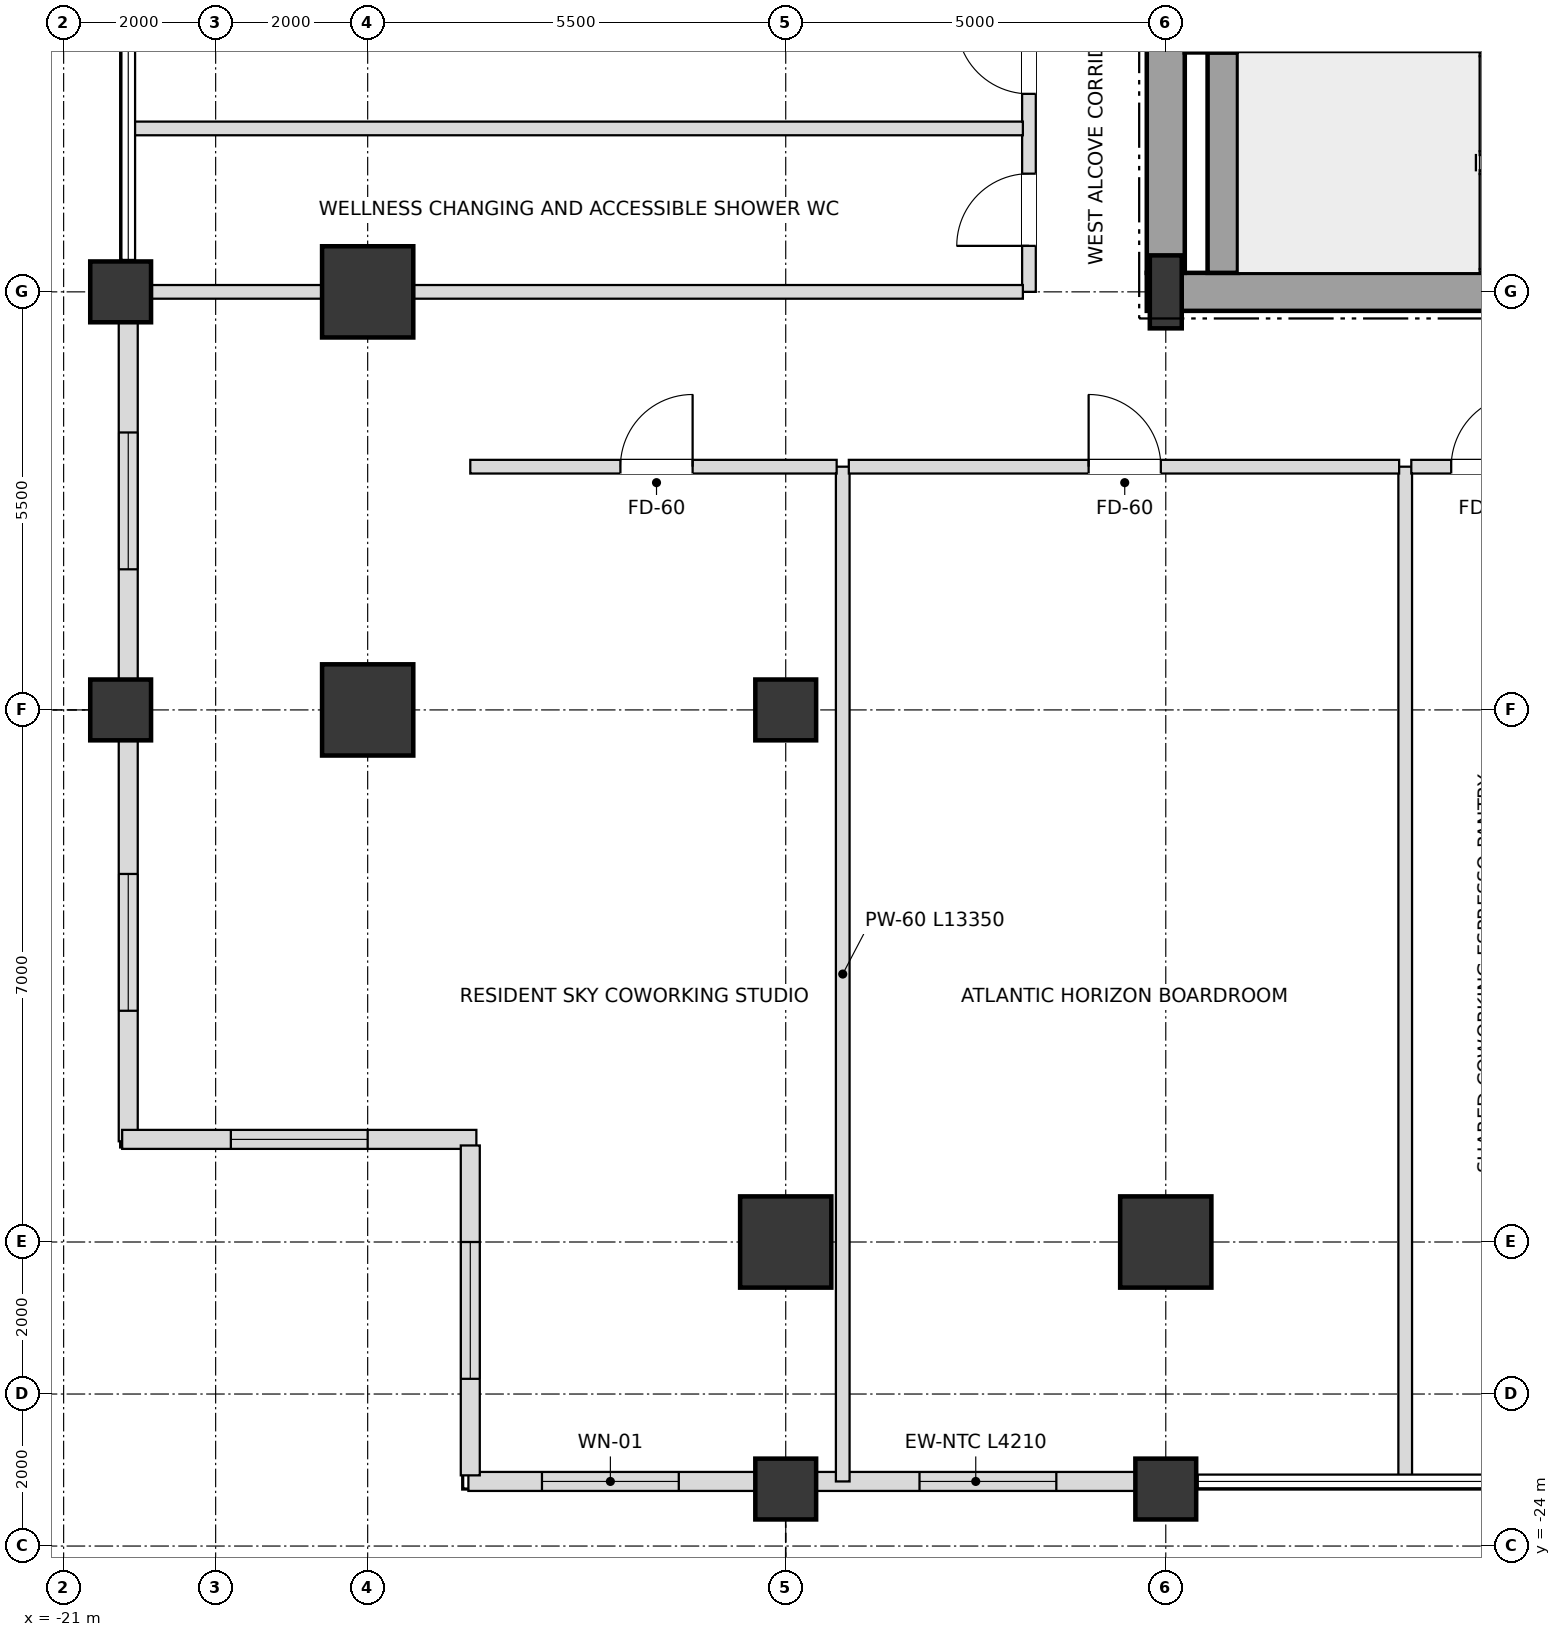
"""IFC4 building model, lengths in metres.
Left out: names, types, materials, properties, quantities, classifications, styles, units other than length and angle.
Written with IfcOpenShell. Run it as: python <this file> out.ifc"""

import sys

from ifc_helpers import new_model, si_unit, direction, frame, frame_2d, origin, origin_2d, place, context, subcontext, project, spatial, rectangle, i_section, extrude, element, fill, save


model = new_model("IFC4")
c1 = context("Model", 3, precision=1e-05, world=origin(), true_north=direction((0.0, 1.0)))
c2 = subcontext(c1, "Body", "Model", "MODEL_VIEW")
j1 = project(units=[si_unit("LENGTHUNIT", "METRE"), si_unit("PLANEANGLEUNIT", "RADIAN")], contexts=[c1])
p1 = place(None, origin())
s1 = spatial("IfcSite", under=j1, at=p1, CompositionType="ELEMENT")
p2 = place(p1, origin())
s2 = spatial("IfcBuilding", under=s1, at=p2, CompositionType="ELEMENT")
p3 = place(p2, frame((0.0, 0.0, 154.8)))
s3 = spatial("IfcBuildingStorey", under=s2, at=p3, CompositionType="ELEMENT", Elevation=154.8)
p4 = place(p3, frame((-6.5, -7.5, 0.0), z_axis=(0.0, 0.0, 1.0), x_axis=(1.0, 0.0, 0.0)))
e1 = element("IfcColumn", 1, at=p4, inside=s3, PredefinedType="COLUMN", context=c2, shape_type="SweptSolid", body=[
    extrude(i_section(OverallWidth=0.42, OverallDepth=0.96, WebThickness=0.022, FlangeThickness=0.034, at=origin_2d()), origin(), (0.0, 0.0, 1.0), 3.6),
])
for number, where, z_axis, x_axis in (
    (2, (-11.5, -20.0, 0.0), (0.0, 0.0, 1.0), (1.0, 0.0, 0.0)),
    (3, (-6.5, -20.0, 0.0), (0.0, 0.0, 1.0), (1.0, 0.0, 0.0)),
    (4, (-17.0, -7.5, 0.0), (0.0, 0.0, 1.0), (1.0, 0.0, 0.0)),
    (5, (-17.0, -13.0, 0.0), (0.0, 0.0, 1.0), (1.0, 0.0, 0.0)),
):
    element("IfcColumn", number, at=place(p3, frame(where, z_axis=z_axis, x_axis=x_axis)), inside=s3, PredefinedType="USERDEFINED", context=c2, shape_type="SweptSolid", body=[
        extrude(rectangle(XDim=1.2, YDim=1.2, at=origin_2d()), origin(), (0.0, 0.0, 1.0), 3.6),
    ])
for number, where, z_axis, x_axis in (
    (6, (-11.5, -13.0, 0.0), (0.0, 0.0, 1.0), (1.0, 0.0, 0.0)),
    (7, (-11.5, -23.25, 0.0), (0.0, 0.0, 1.0), (1.0, 0.0, 0.0)),
    (8, (-6.5, -23.25, 0.0), (0.0, 0.0, 1.0), (1.0, 0.0, 0.0)),
    (9, (-20.25, -13.0, 0.0), (0.0, 0.0, 1.0), (1.0, 0.0, 0.0)),
    (10, (-20.25, -7.5, 0.0), (0.0, 0.0, 1.0), (1.0, 0.0, 0.0)),
):
    element("IfcColumn", number, at=place(p3, frame(where, z_axis=z_axis, x_axis=x_axis)), inside=s3, PredefinedType="COLUMN", context=c2, shape_type="SweptSolid", body=[
        extrude(rectangle(XDim=0.8, YDim=0.8, at=origin_2d()), origin(), (0.0, 0.0, 1.0), 3.6),
    ])
p5 = place(p3, frame((-15.675, -23.15, 0.0), z_axis=(0.0, 0.0, 1.0), x_axis=(1.0, 0.0, 0.0)))
e11 = element("IfcWall", 11, at=p5, inside=s3, PredefinedType="SOLIDWALL", context=c2, shape_type="SweptSolid", body=[
    extrude(rectangle(XDim=3.78, YDim=0.25, at=frame_2d((1.89, 0.0))), origin(), (0.0, 0.0, 1.0), 2.736),
])
p6 = place(p5, frame((0.968, 0.0, 0.72)))
e12 = element("IfcOpeningElement", 12, at=p6, cuts=e11, PredefinedType="OPENING", context=c2, shape_type="SweptSolid", body=[
    extrude(rectangle(XDim=1.8, YDim=1.68, at=frame_2d((0.9, 0.84))), frame((0.0, 0.135, 0.0), z_axis=(0.0, -1.0, 0.0), x_axis=(1.0, 0.0, 0.0)), (0.0, 0.0, 1.0), 0.27),
])
p7 = place(p3, frame((-11.105, -23.15, 0.0), z_axis=(0.0, 0.0, 1.0), x_axis=(1.0, 0.0, 0.0)))
e13 = element("IfcWall", 13, at=p7, inside=s3, PredefinedType="SOLIDWALL", context=c2, shape_type="SweptSolid", body=[
    extrude(rectangle(XDim=4.21, YDim=0.25, at=frame_2d((2.105, 0.0))), origin(), (0.0, 0.0, 1.0), 2.736),
])
p8 = place(p7, frame((1.365, 0.0, 0.72)))
e14 = element("IfcOpeningElement", 14, at=p8, cuts=e13, PredefinedType="OPENING", context=c2, shape_type="SweptSolid", body=[
    extrude(rectangle(XDim=1.8, YDim=1.68, at=frame_2d((0.9, 0.84))), frame((0.0, 0.135, 0.0), z_axis=(0.0, -1.0, 0.0), x_axis=(1.0, 0.0, 0.0)), (0.0, 0.0, 1.0), 0.27),
])
p9 = place(p3, frame((-20.15, -7.895, 0.0), z_axis=(0.0, 0.0, 1.0), x_axis=(0.0, -1.0, 0.0)))
e15 = element("IfcWall", 15, at=p9, inside=s3, PredefinedType="SOLIDWALL", context=c2, shape_type="SweptSolid", body=[
    extrude(rectangle(XDim=4.71, YDim=0.25, at=frame_2d((2.355, 0.0))), origin(), (0.0, 0.0, 1.0), 2.736),
])
p10 = place(p9, frame((1.455, 0.0, 0.72)))
e16 = element("IfcOpeningElement", 16, at=p10, cuts=e15, PredefinedType="OPENING", context=c2, shape_type="SweptSolid", body=[
    extrude(rectangle(XDim=1.8, YDim=1.68, at=frame_2d((0.9, 0.84))), frame((0.0, 0.135, 0.0), z_axis=(0.0, -1.0, 0.0), x_axis=(1.0, 0.0, 0.0)), (0.0, 0.0, 1.0), 0.27),
])
p11 = place(p3, frame((-20.15, -13.395, 0.0), z_axis=(0.0, 0.0, 1.0), x_axis=(0.0, -1.0, 0.0)))
e17 = element("IfcWall", 17, at=p11, inside=s3, PredefinedType="SOLIDWALL", context=c2, shape_type="SweptSolid", body=[
    extrude(rectangle(XDim=5.28, YDim=0.25, at=frame_2d((2.64, 0.0))), origin(), (0.0, 0.0, 1.0), 2.736),
])
p12 = place(p11, frame((1.763, 0.0, 0.72)))
e18 = element("IfcOpeningElement", 18, at=p12, cuts=e17, PredefinedType="OPENING", context=c2, shape_type="SweptSolid", body=[
    extrude(rectangle(XDim=1.8, YDim=1.68, at=frame_2d((0.9, 0.84))), frame((0.0, 0.135, 0.0), z_axis=(0.0, -1.0, 0.0), x_axis=(1.0, 0.0, 0.0)), (0.0, 0.0, 1.0), 0.27),
])
p13 = place(p3, frame((-20.23, -18.65, 0.0), z_axis=(0.0, 0.0, 1.0), x_axis=(1.0, 0.0, 0.0)))
e19 = element("IfcWall", 19, at=p13, inside=s3, PredefinedType="SOLIDWALL", context=c2, shape_type="SweptSolid", body=[
    extrude(rectangle(XDim=4.66, YDim=0.25, at=frame_2d((2.33, 0.0))), origin(), (0.0, 0.0, 1.0), 2.736),
])
p14 = place(p13, frame((1.43, 0.0, 0.72)))
e20 = element("IfcOpeningElement", 20, at=p14, cuts=e19, PredefinedType="OPENING", context=c2, shape_type="SweptSolid", body=[
    extrude(rectangle(XDim=1.8, YDim=1.68, at=frame_2d((0.9, 0.84))), frame((0.0, 0.135, 0.0), z_axis=(0.0, -1.0, 0.0), x_axis=(1.0, 0.0, 0.0)), (0.0, 0.0, 1.0), 0.27),
])
p15 = place(p3, frame((-15.65, -18.73, 0.0), z_axis=(0.0, 0.0, 1.0), x_axis=(0.0, -1.0, 0.0)))
e21 = element("IfcWall", 21, at=p15, inside=s3, PredefinedType="SOLIDWALL", context=c2, shape_type="SweptSolid", body=[
    extrude(rectangle(XDim=4.34, YDim=0.25, at=frame_2d((2.17, 0.0))), origin(), (0.0, 0.0, 1.0), 2.736),
])
p16 = place(p15, frame((1.27, 0.0, 0.72)))
e22 = element("IfcOpeningElement", 22, at=p16, cuts=e21, PredefinedType="OPENING", context=c2, shape_type="SweptSolid", body=[
    extrude(rectangle(XDim=1.8, YDim=1.68, at=frame_2d((0.9, 0.84))), frame((0.0, 0.135, 0.0), z_axis=(0.0, -1.0, 0.0), x_axis=(1.0, 0.0, 0.0)), (0.0, 0.0, 1.0), 0.27),
])
p17 = place(p3, frame((-6.75, -7.5, 0.0), z_axis=(0.0, 0.0, 1.0), x_axis=(1.0, 0.0, 0.0)))
e23 = element("IfcWall", 23, at=p17, inside=s3, PredefinedType="SHEAR", context=c2, shape_type="SweptSolid", body=[
    extrude(rectangle(XDim=6.75, YDim=0.5, at=frame_2d((3.375, 0.0))), origin(), (0.0, 0.0, 1.0), 3.38),
])
p18 = place(p3, frame((-6.5, -7.25, 0.0), z_axis=(0.0, 0.0, 1.0), x_axis=(0.0, 1.0, 0.0)))
e24 = element("IfcWall", 24, at=p18, inside=s3, PredefinedType="SHEAR", context=c2, shape_type="SweptSolid", body=[
    extrude(rectangle(XDim=3.55, YDim=0.5, at=frame_2d((1.775, 0.0))), origin(), (0.0, 0.0, 1.0), 3.38),
])
p19 = place(p3, frame((-5.75, -7.25, 0.0), z_axis=(0.0, 0.0, 1.0), x_axis=(0.0, 1.0, 0.0)))
e25 = element("IfcWall", 25, at=p19, inside=s3, PredefinedType="SHEAR", context=c2, shape_type="SweptSolid", body=[
    extrude(rectangle(XDim=2.9, YDim=0.4, at=frame_2d((1.45, 0.0))), origin(), (0.0, 0.0, 1.0), 3.38),
])
p20 = place(p3, frame((-10.75, -23.15, 0.0), z_axis=(0.0, 0.0, 1.0), x_axis=(0.0, 1.0, 0.0)))
e26 = element("IfcWall", 26, at=p20, inside=s3, PredefinedType="PARTITIONING", context=c2, shape_type="SweptSolid", body=[
    extrude(rectangle(XDim=13.35, YDim=0.18, at=frame_2d((6.675, 0.0))), origin(), (0.0, 0.0, 1.0), 2.816),
])
p21 = place(p3, frame((-8.3, -7.5, 0.0), z_axis=(0.0, 0.0, 1.0), x_axis=(0.0, 1.0, 0.0)))
e27 = element("IfcWall", 27, at=p21, inside=s3, PredefinedType="PARTITIONING", context=c2, shape_type="SweptSolid", body=[
    extrude(rectangle(XDim=15.0, YDim=0.18, at=frame_2d((7.5, 0.0))), origin(), (0.0, 0.0, 1.0), 3.38),
])
p22 = place(p21, frame((0.605, 0.0, 0.0)))
e28 = element("IfcOpeningElement", 28, at=p22, cuts=e27, PredefinedType="OPENING", context=c2, shape_type="SweptSolid", body=[
    extrude(rectangle(XDim=0.95, YDim=2.15, at=frame_2d((0.475, 1.075))), frame((0.0, 0.1, 0.0), z_axis=(0.0, -1.0, 0.0), x_axis=(1.0, 0.0, 0.0)), (0.0, 0.0, 1.0), 0.2),
])
p23 = place(p21, frame((2.605, 0.0, 0.0)))
e29 = element("IfcOpeningElement", 29, at=p23, cuts=e27, PredefinedType="OPENING", context=c2, shape_type="SweptSolid", body=[
    extrude(rectangle(XDim=0.95, YDim=2.15, at=frame_2d((0.475, 1.075))), frame((0.0, 0.1, 0.0), z_axis=(0.0, -1.0, 0.0), x_axis=(1.0, 0.0, 0.0)), (0.0, 0.0, 1.0), 0.2),
])
p24 = place(p3, frame((-3.35, -23.15, 0.0), z_axis=(0.0, 0.0, 1.0), x_axis=(0.0, 1.0, 0.0)))
e30 = element("IfcWall", 30, at=p24, inside=s3, PredefinedType="PARTITIONING", context=c2, shape_type="SweptSolid", body=[
    extrude(rectangle(XDim=13.35, YDim=0.18, at=frame_2d((6.675, 0.0))), origin(), (0.0, 0.0, 1.0), 2.816),
])
p25 = place(p3, frame((-15.65, -9.8, 0.0), z_axis=(0.0, 0.0, 1.0), x_axis=(1.0, 0.0, 0.0)))
e31 = element("IfcWall", 31, at=p25, inside=s3, PredefinedType="PARTITIONING", context=c2, shape_type="SweptSolid", body=[
    extrude(rectangle(XDim=4.82, YDim=0.18, at=frame_2d((2.41, 0.0))), origin(), (0.0, 0.0, 1.0), 3.38),
])
p26 = place(p25, frame((1.975, 0.0, 0.0)))
e32 = element("IfcOpeningElement", 32, at=p26, cuts=e31, PredefinedType="OPENING", context=c2, shape_type="SweptSolid", body=[
    extrude(rectangle(XDim=0.95, YDim=2.15, at=frame_2d((0.475, 1.075))), frame((0.0, 0.1, 0.0), z_axis=(0.0, -1.0, 0.0), x_axis=(1.0, 0.0, 0.0)), (0.0, 0.0, 1.0), 0.2),
])
p27 = place(p3, frame((-10.67, -9.8, 0.0), z_axis=(0.0, 0.0, 1.0), x_axis=(1.0, 0.0, 0.0)))
e33 = element("IfcWall", 33, at=p27, inside=s3, PredefinedType="PARTITIONING", context=c2, shape_type="SweptSolid", body=[
    extrude(rectangle(XDim=7.24, YDim=0.18, at=frame_2d((3.62, 0.0))), origin(), (0.0, 0.0, 1.0), 2.816),
])
p28 = place(p27, frame((3.155, 0.0, 0.0)))
e34 = element("IfcOpeningElement", 34, at=p28, cuts=e33, PredefinedType="OPENING", context=c2, shape_type="SweptSolid", body=[
    extrude(rectangle(XDim=0.95, YDim=2.15, at=frame_2d((0.475, 1.075))), frame((0.0, 0.1, 0.0), z_axis=(0.0, -1.0, 0.0), x_axis=(1.0, 0.0, 0.0)), (0.0, 0.0, 1.0), 0.2),
])
p29 = place(p3, frame((-3.27, -9.8, 0.0), z_axis=(0.0, 0.0, 1.0), x_axis=(1.0, 0.0, 0.0)))
e35 = element("IfcWall", 35, at=p29, inside=s3, PredefinedType="PARTITIONING", context=c2, shape_type="SweptSolid", body=[
    extrude(rectangle(XDim=1.99, YDim=0.18, at=frame_2d((0.995, 0.0))), origin(), (0.0, 0.0, 1.0), 3.38),
])
p30 = place(p29, frame((0.525, 0.0, 0.0)))
e36 = element("IfcOpeningElement", 36, at=p30, cuts=e35, PredefinedType="OPENING", context=c2, shape_type="SweptSolid", body=[
    extrude(rectangle(XDim=0.95, YDim=2.15, at=frame_2d((0.475, 1.075))), frame((0.0, 0.1, 0.0), z_axis=(0.0, -1.0, 0.0), x_axis=(1.0, 0.0, 0.0)), (0.0, 0.0, 1.0), 0.2),
])
p31 = place(p3, frame((-20.15, -7.5, 0.0), z_axis=(0.0, 0.0, 1.0), x_axis=(1.0, 0.0, 0.0)))
e37 = element("IfcWall", 37, at=p31, inside=s3, PredefinedType="PARTITIONING", context=c2, shape_type="SweptSolid", body=[
    extrude(rectangle(XDim=11.77, YDim=0.18, at=frame_2d((5.885, 0.0))), origin(), (0.0, 0.0, 1.0), 2.816),
])
p32 = place(p3, frame((-20.07, -5.35, 0.0), z_axis=(0.0, 0.0, 1.0), x_axis=(1.0, 0.0, 0.0)))
e38 = element("IfcWall", 38, at=p32, inside=s3, PredefinedType="PARTITIONING", context=c2, shape_type="SweptSolid", body=[
    extrude(rectangle(XDim=11.69, YDim=0.18, at=frame_2d((5.845, 0.0))), origin(), (0.0, 0.0, 1.0), 2.816),
])
p33 = place(p6, origin())
e39 = element("IfcWindow", 39, at=p33, inside=s3, PartitioningType="SINGLE_PANEL", PredefinedType="WINDOW", context=c2, shape_type="SweptSolid", body=[
    extrude(rectangle(XDim=1.8, YDim=1.68, at=frame_2d((0.9, 0.84))), frame((0.0, 0.03, 0.0), z_axis=(0.0, -1.0, 0.0), x_axis=(1.0, 0.0, 0.0)), (0.0, 0.0, 1.0), 0.06),
])
fill(e12, e39)
p34 = place(p8, origin())
e40 = element("IfcWindow", 40, at=p34, inside=s3, PartitioningType="SINGLE_PANEL", PredefinedType="WINDOW", context=c2, shape_type="SweptSolid", body=[
    extrude(rectangle(XDim=1.8, YDim=1.68, at=frame_2d((0.9, 0.84))), frame((0.0, 0.03, 0.0), z_axis=(0.0, -1.0, 0.0), x_axis=(1.0, 0.0, 0.0)), (0.0, 0.0, 1.0), 0.06),
])
fill(e14, e40)
p35 = place(p10, origin())
e41 = element("IfcWindow", 41, at=p35, inside=s3, PartitioningType="SINGLE_PANEL", PredefinedType="WINDOW", context=c2, shape_type="SweptSolid", body=[
    extrude(rectangle(XDim=1.8, YDim=1.68, at=frame_2d((0.9, 0.84))), frame((0.0, 0.03, 0.0), z_axis=(0.0, -1.0, 0.0), x_axis=(1.0, 0.0, 0.0)), (0.0, 0.0, 1.0), 0.06),
])
fill(e16, e41)
p36 = place(p12, origin())
e42 = element("IfcWindow", 42, at=p36, inside=s3, PartitioningType="SINGLE_PANEL", PredefinedType="WINDOW", context=c2, shape_type="SweptSolid", body=[
    extrude(rectangle(XDim=1.8, YDim=1.68, at=frame_2d((0.9, 0.84))), frame((0.0, 0.03, 0.0), z_axis=(0.0, -1.0, 0.0), x_axis=(1.0, 0.0, 0.0)), (0.0, 0.0, 1.0), 0.06),
])
fill(e18, e42)
p37 = place(p14, origin())
e43 = element("IfcWindow", 43, at=p37, inside=s3, PartitioningType="SINGLE_PANEL", PredefinedType="WINDOW", context=c2, shape_type="SweptSolid", body=[
    extrude(rectangle(XDim=1.8, YDim=1.68, at=frame_2d((0.9, 0.84))), frame((0.0, 0.03, 0.0), z_axis=(0.0, -1.0, 0.0), x_axis=(1.0, 0.0, 0.0)), (0.0, 0.0, 1.0), 0.06),
])
fill(e20, e43)
p38 = place(p16, origin())
e44 = element("IfcWindow", 44, at=p38, inside=s3, PartitioningType="SINGLE_PANEL", PredefinedType="WINDOW", context=c2, shape_type="SweptSolid", body=[
    extrude(rectangle(XDim=1.8, YDim=1.68, at=frame_2d((0.9, 0.84))), frame((0.0, 0.03, 0.0), z_axis=(0.0, -1.0, 0.0), x_axis=(1.0, 0.0, 0.0)), (0.0, 0.0, 1.0), 0.06),
])
fill(e22, e44)
p39 = place(p26, origin())
e45 = element("IfcDoor", 45, at=p39, inside=s3, OperationType="SINGLE_SWING_RIGHT", PredefinedType="DOOR", context=c2, shape_type="SweptSolid", body=[
    extrude(rectangle(XDim=0.95, YDim=2.15, at=frame_2d((0.475, 1.075))), frame((0.0, 0.025, 0.0), z_axis=(0.0, -1.0, 0.0), x_axis=(1.0, 0.0, 0.0)), (0.0, 0.0, 1.0), 0.05),
])
fill(e32, e45)
p40 = place(p28, origin())
e46 = element("IfcDoor", 46, at=p40, inside=s3, OperationType="SINGLE_SWING_LEFT", PredefinedType="DOOR", context=c2, shape_type="SweptSolid", body=[
    extrude(rectangle(XDim=0.95, YDim=2.15, at=frame_2d((0.475, 1.075))), frame((0.0, 0.025, 0.0), z_axis=(0.0, -1.0, 0.0), x_axis=(1.0, 0.0, 0.0)), (0.0, 0.0, 1.0), 0.05),
])
fill(e34, e46)
p41 = place(p30, origin())
e47 = element("IfcDoor", 47, at=p41, inside=s3, OperationType="SINGLE_SWING_RIGHT", PredefinedType="DOOR", context=c2, shape_type="SweptSolid", body=[
    extrude(rectangle(XDim=0.95, YDim=2.15, at=frame_2d((0.475, 1.075))), frame((0.0, 0.025, 0.0), z_axis=(0.0, -1.0, 0.0), x_axis=(1.0, 0.0, 0.0)), (0.0, 0.0, 1.0), 0.05),
])
fill(e36, e47)
p42 = place(p22, origin())
e48 = element("IfcDoor", 48, at=p42, inside=s3, OperationType="SINGLE_SWING_LEFT", PredefinedType="DOOR", context=c2, shape_type="SweptSolid", body=[
    extrude(rectangle(XDim=0.95, YDim=2.15, at=frame_2d((0.475, 1.075))), frame((0.0, 0.025, 0.0), z_axis=(0.0, -1.0, 0.0), x_axis=(1.0, 0.0, 0.0)), (0.0, 0.0, 1.0), 0.05),
])
fill(e28, e48)
p43 = place(p23, origin())
e49 = element("IfcDoor", 49, at=p43, inside=s3, OperationType="SINGLE_SWING_RIGHT", PredefinedType="DOOR", context=c2, shape_type="SweptSolid", body=[
    extrude(rectangle(XDim=0.95, YDim=2.15, at=frame_2d((0.475, 1.075))), frame((0.0, 0.025, 0.0), z_axis=(0.0, -1.0, 0.0), x_axis=(1.0, 0.0, 0.0)), (0.0, 0.0, 1.0), 0.05),
])
fill(e29, e49)
save(model, sys.argv[1])
